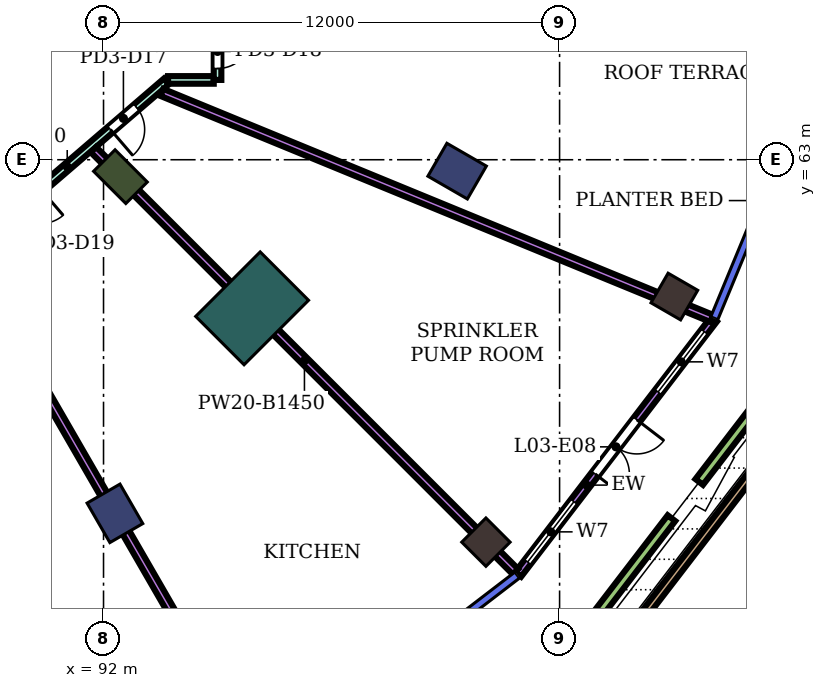
"""IFC4 building model, lengths in metres.
Left out: names, types, materials, properties, quantities, classifications, styles, units other than length and angle.
Written with IfcOpenShell. Run it as: python <this file> out.ifc"""

import sys

from ifc_helpers import new_model, si_unit, direction, frame, frame_2d, origin, origin_2d, place, context, subcontext, project, spatial, rectangle, extrude, element, fill, save


model = new_model("IFC4")
c1 = context("Model", 3, precision=1e-05, world=origin(), true_north=direction((0.0, 1.0)))
c2 = subcontext(c1, "Body", "Model", "MODEL_VIEW")
j1 = project(units=[si_unit("LENGTHUNIT", "METRE"), si_unit("PLANEANGLEUNIT", "RADIAN")], contexts=[c1])
p1 = place(None, origin())
s1 = spatial("IfcSite", under=j1, at=p1, CompositionType="ELEMENT")
p2 = place(p1, origin())
s2 = spatial("IfcBuilding", under=s1, at=p2, CompositionType="ELEMENT")
p3 = place(p2, frame((0.0, 0.0, 17.8)))
s3 = spatial("IfcBuildingStorey", under=s2, at=p3, CompositionType="ELEMENT", Elevation=17.8)
for number, where, z_axis, x_axis in (
    (1, (102.062, 52.938, 0.0), (0.0, 0.0, 1.0), (0.707, -0.707, 0.0)),
    (2, (107.02, 59.4, 0.0), (0.0, 0.0, 1.0), (0.866, -0.5, 0.0)),
):
    element("IfcColumn", number, at=place(p3, frame(where, z_axis=z_axis, x_axis=x_axis)), inside=s3, PredefinedType="COLUMN", context=c2, shape_type="SweptSolid", body=[
        extrude(rectangle(XDim=0.9, YDim=0.9, at=origin_2d()), origin(), (0.0, 0.0, 1.0), 6.0),
    ])
for number, where, z_axis, x_axis in (
    (3, (92.3, 53.696, 0.0), (0.0, 0.0, 1.0), (0.5, -0.866, 0.0)),
    (4, (101.304, 62.7, 0.0), (0.0, 0.0, 1.0), (0.866, -0.5, 0.0)),
):
    element("IfcColumn", number, at=place(p3, frame(where, z_axis=z_axis, x_axis=x_axis)), inside=s3, PredefinedType="COLUMN", context=c2, shape_type="SweptSolid", body=[
        extrude(rectangle(XDim=1.2, YDim=1.0, at=origin_2d()), origin(), (0.0, 0.0, 1.0), 6.0),
    ])
p4 = place(p3, frame((92.445, 62.555, 0.0), z_axis=(0.0, 0.0, 1.0), x_axis=(0.707106781187, -0.707106781187, 0.0)))
e5 = element("IfcColumn", 5, at=p4, inside=s3, PredefinedType="COLUMN", context=c2, shape_type="SweptSolid", body=[
    extrude(rectangle(XDim=1.2, YDim=0.8, at=origin_2d()), origin(), (0.0, 0.0, 1.0), 6.0),
])
p5 = place(p3, frame((95.91, 59.09, 0.0), z_axis=(0.0, 0.0, 1.0), x_axis=(0.707106781187, -0.707106781187, 0.0)))
e6 = element("IfcColumn", 6, at=p5, inside=s3, PredefinedType="COLUMN", context=c2, shape_type="SweptSolid", body=[
    extrude(rectangle(XDim=1.8, YDim=2.4, at=origin_2d()), origin(), (0.0, 0.0, 1.0), 6.0),
])
p6 = place(p3, frame((102.91, 52.09, 0.0), z_axis=(0.0, 0.0, 1.0), x_axis=(0.608761751223, 0.793353093047, 0.0)))
e7 = element("IfcWall", 7, at=p6, inside=s3, PredefinedType="NOTDEFINED", context=c2, shape_type="SweptSolid", body=[
    extrude(rectangle(XDim=8.458, YDim=0.2, at=frame_2d((4.229, 0.0))), origin(), (0.0, 0.0, 1.0), 6.0),
])
p7 = place(p6, frame((0.41, 0.0, 0.9)))
e8 = element("IfcOpeningElement", 8, at=p7, cuts=e7, PredefinedType="OPENING", context=c2, shape_type="SweptSolid", body=[
    extrude(rectangle(XDim=2.0, YDim=3.0, at=frame_2d((1.0, 1.5))), frame((0.0, 0.11, 0.0), z_axis=(0.0, -1.0, 0.0), x_axis=(1.0, 0.0, 0.0)), (0.0, 0.0, 1.0), 0.22),
])
p8 = place(p6, frame((3.329, 0.0, 0.0)))
e9 = element("IfcOpeningElement", 9, at=p8, cuts=e7, PredefinedType="OPENING", context=c2, shape_type="SweptSolid", body=[
    extrude(rectangle(XDim=1.8, YDim=2.4, at=frame_2d((0.9, 1.2))), frame((0.0, 0.11, 0.0), z_axis=(0.0, -1.0, 0.0), x_axis=(1.0, 0.0, 0.0)), (0.0, 0.0, 1.0), 0.22),
])
p9 = place(p6, frame((6.048, 0.0, 0.9)))
e10 = element("IfcOpeningElement", 10, at=p9, cuts=e7, PredefinedType="OPENING", context=c2, shape_type="SweptSolid", body=[
    extrude(rectangle(XDim=2.0, YDim=3.0, at=frame_2d((1.0, 1.5))), frame((0.0, 0.11, 0.0), z_axis=(0.0, -1.0, 0.0), x_axis=(1.0, 0.0, 0.0)), (0.0, 0.0, 1.0), 0.22),
])
p10 = place(p3, frame((110.907, 57.141, 0.0), z_axis=(0.0, 0.0, 1.0), x_axis=(-0.608745337968, -0.793365687122, 0.0)))
e11 = element("IfcWall", 11, at=p10, inside=s3, PredefinedType="PARAPET", context=c2, shape_type="SweptSolid", body=[
    extrude(rectangle(XDim=9.292, YDim=0.2, at=frame_2d((4.646, 0.0))), origin(), (0.0, 0.0, 1.0), 1.1),
])
p11 = place(p3, frame((110.058, 57.627, 0.0), z_axis=(0.0, 0.0, 1.0), x_axis=(-0.608773153249, -0.793344343828, 0.0)))
e12 = element("IfcWall", 12, at=p11, inside=s3, PredefinedType="USERDEFINED", context=c2, shape_type="SweptSolid", body=[
    extrude(rectangle(XDim=3.915, YDim=0.25, at=frame_2d((1.958, 0.0))), origin(), (0.0, 0.0, 1.0), 0.6),
])
p12 = place(p3, frame((106.944, 53.569, 0.0), z_axis=(0.0, 0.0, 1.0), x_axis=(-0.608784178897, -0.79333588317, 0.0)))
e13 = element("IfcWall", 13, at=p12, inside=s3, PredefinedType="USERDEFINED", context=c2, shape_type="SweptSolid", body=[
    extrude(rectangle(XDim=3.924, YDim=0.25, at=frame_2d((1.962, 0.0))), origin(), (0.0, 0.0, 1.0), 0.6),
])
p13 = place(p3, frame((88.436, 60.573, 0.0), z_axis=(0.0, 0.0, 1.0), x_axis=(0.758186248639, 0.652038045189, 0.0)))
e14 = element("IfcWall", 14, at=p13, inside=s3, PredefinedType="PARTITIONING", context=c2, shape_type="SweptSolid", body=[
    extrude(rectangle(XDim=6.882, YDim=0.2, at=frame_2d((3.441, 0.0))), origin(), (0.0, 0.0, 1.0), 5.55),
])
p14 = place(p13, frame((4.941, 0.0, 0.0)))
e15 = element("IfcOpeningElement", 15, at=p14, cuts=e14, PredefinedType="OPENING", context=c2, shape_type="SweptSolid", body=[
    extrude(rectangle(XDim=0.9, YDim=2.1, at=frame_2d((0.45, 1.05))), frame((0.0, 0.11, 0.0), z_axis=(0.0, -1.0, 0.0), x_axis=(1.0, 0.0, 0.0)), (0.0, 0.0, 1.0), 0.22),
])
p15 = place(p13, frame((1.627, 0.0, 0.0)))
e16 = element("IfcOpeningElement", 16, at=p15, cuts=e14, PredefinedType="OPENING", context=c2, shape_type="SweptSolid", body=[
    extrude(rectangle(XDim=0.9, YDim=2.1, at=frame_2d((0.45, 1.05))), frame((0.0, 0.11, 0.0), z_axis=(0.0, -1.0, 0.0), x_axis=(1.0, 0.0, 0.0)), (0.0, 0.0, 1.0), 0.22),
])
p16 = place(p3, frame((88.364, 60.51, 0.0), z_axis=(0.0, 0.0, 1.0), x_axis=(0.499978131111, -0.866038029425, 0.0)))
e17 = element("IfcWall", 17, at=p16, inside=s3, PredefinedType="PARTITIONING", context=c2, shape_type="SweptSolid", body=[
    extrude(rectangle(XDim=15.567, YDim=0.2, at=frame_2d((7.784, 0.0))), origin(), (0.0, 0.0, 1.0), 4.55),
])
p17 = place(p3, frame((91.735, 63.265, 0.0), z_axis=(0.0, 0.0, 1.0), x_axis=(0.707106781187, -0.707106781187, 0.0)))
e18 = element("IfcWall", 18, at=p17, inside=s3, PredefinedType="PARTITIONING", context=c2, shape_type="SweptSolid", body=[
    extrude(rectangle(XDim=15.703, YDim=0.2, at=frame_2d((7.851, 0.0))), origin(), (0.0, 0.0, 1.0), 4.55),
])
p18 = place(p3, frame((93.535, 64.771, 0.0), z_axis=(0.0, 0.0, 1.0), x_axis=(0.92493209613, -0.380132368457, 0.0)))
e19 = element("IfcWall", 19, at=p18, inside=s3, PredefinedType="PARTITIONING", context=c2, shape_type="SweptSolid", body=[
    extrude(rectangle(XDim=15.654, YDim=0.2, at=frame_2d((7.827, 0.0))), origin(), (0.0, 0.0, 1.0), 4.55),
])
p19 = place(p3, frame((93.698, 65.1, 0.0), z_axis=(0.0, 0.0, 1.0), x_axis=(1.0, 0.0, 0.0)))
e20 = element("IfcWall", 20, at=p19, inside=s3, PredefinedType="PARTITIONING", context=c2, shape_type="SweptSolid", body=[
    extrude(rectangle(XDim=1.202, YDim=0.2, at=frame_2d((0.601, 0.0))), origin(), (0.0, 0.0, 1.0), 5.55),
])
p20 = place(p3, frame((95.0, 65.1, 0.0), z_axis=(0.0, 0.0, 1.0), x_axis=(0.0, 1.0, 0.0)))
e21 = element("IfcWall", 21, at=p20, inside=s3, PredefinedType="PARTITIONING", context=c2, shape_type="SweptSolid", body=[
    extrude(rectangle(XDim=1.499, YDim=0.2, at=frame_2d((0.75, 0.0))), origin(), (0.0, 0.0, 1.0), 5.55),
])
p21 = place(p20, frame((0.3, 0.0, 0.0)))
e22 = element("IfcOpeningElement", 22, at=p21, cuts=e21, PredefinedType="OPENING", context=c2, shape_type="SweptSolid", body=[
    extrude(rectangle(XDim=0.9, YDim=2.1, at=frame_2d((0.45, 1.05))), frame((0.0, 0.11, 0.0), z_axis=(0.0, -1.0, 0.0), x_axis=(1.0, 0.0, 0.0)), (0.0, 0.0, 1.0), 0.22),
])
p22 = place(p7, origin())
e23 = element("IfcWindow", 23, at=p22, inside=s3, PartitioningType="SINGLE_PANEL", PredefinedType="WINDOW", context=c2, shape_type="SweptSolid", body=[
    extrude(rectangle(XDim=2.0, YDim=3.0, at=frame_2d((1.0, 1.5))), frame((0.0, 0.03, 0.0), z_axis=(0.0, -1.0, 0.0), x_axis=(1.0, 0.0, 0.0)), (0.0, 0.0, 1.0), 0.06),
])
fill(e8, e23)
p23 = place(p8, frame((1.8, 0.0, 0.0), z_axis=(0.0, 0.0, 1.0), x_axis=(-1.0, 0.0, 0.0)))
e24 = element("IfcDoor", 24, at=p23, inside=s3, OperationType="DOUBLE_DOOR_SINGLE_SWING", PredefinedType="DOOR", context=c2, shape_type="SweptSolid", body=[
    extrude(rectangle(XDim=1.8, YDim=2.4, at=frame_2d((0.9, 1.2))), frame((0.0, 0.025, 0.0), z_axis=(0.0, -1.0, 0.0), x_axis=(1.0, 0.0, 0.0)), (0.0, 0.0, 1.0), 0.05),
])
fill(e9, e24)
p24 = place(p9, origin())
e25 = element("IfcWindow", 25, at=p24, inside=s3, PartitioningType="SINGLE_PANEL", PredefinedType="WINDOW", context=c2, shape_type="SweptSolid", body=[
    extrude(rectangle(XDim=2.0, YDim=3.0, at=frame_2d((1.0, 1.5))), frame((0.0, 0.03, 0.0), z_axis=(0.0, -1.0, 0.0), x_axis=(1.0, 0.0, 0.0)), (0.0, 0.0, 1.0), 0.06),
])
fill(e10, e25)
p25 = place(p14, frame((0.9, 0.0, 0.0), z_axis=(0.0, 0.0, 1.0), x_axis=(-1.0, 0.0, 0.0)))
e26 = element("IfcDoor", 26, at=p25, inside=s3, OperationType="SINGLE_SWING_RIGHT", PredefinedType="DOOR", context=c2, shape_type="SweptSolid", body=[
    extrude(rectangle(XDim=0.9, YDim=2.1, at=frame_2d((0.45, 1.05))), frame((0.0, 0.025, 0.0), z_axis=(0.0, -1.0, 0.0), x_axis=(1.0, 0.0, 0.0)), (0.0, 0.0, 1.0), 0.05),
])
fill(e15, e26)
p26 = place(p21, frame((0.9, 0.0, 0.0), z_axis=(0.0, 0.0, 1.0), x_axis=(-1.0, 0.0, 0.0)))
e27 = element("IfcDoor", 27, at=p26, inside=s3, OperationType="SINGLE_SWING_LEFT", PredefinedType="DOOR", context=c2, shape_type="SweptSolid", body=[
    extrude(rectangle(XDim=0.9, YDim=2.1, at=frame_2d((0.45, 1.05))), frame((0.0, 0.025, 0.0), z_axis=(0.0, -1.0, 0.0), x_axis=(1.0, 0.0, 0.0)), (0.0, 0.0, 1.0), 0.05),
])
fill(e22, e27)
save(model, sys.argv[1])
